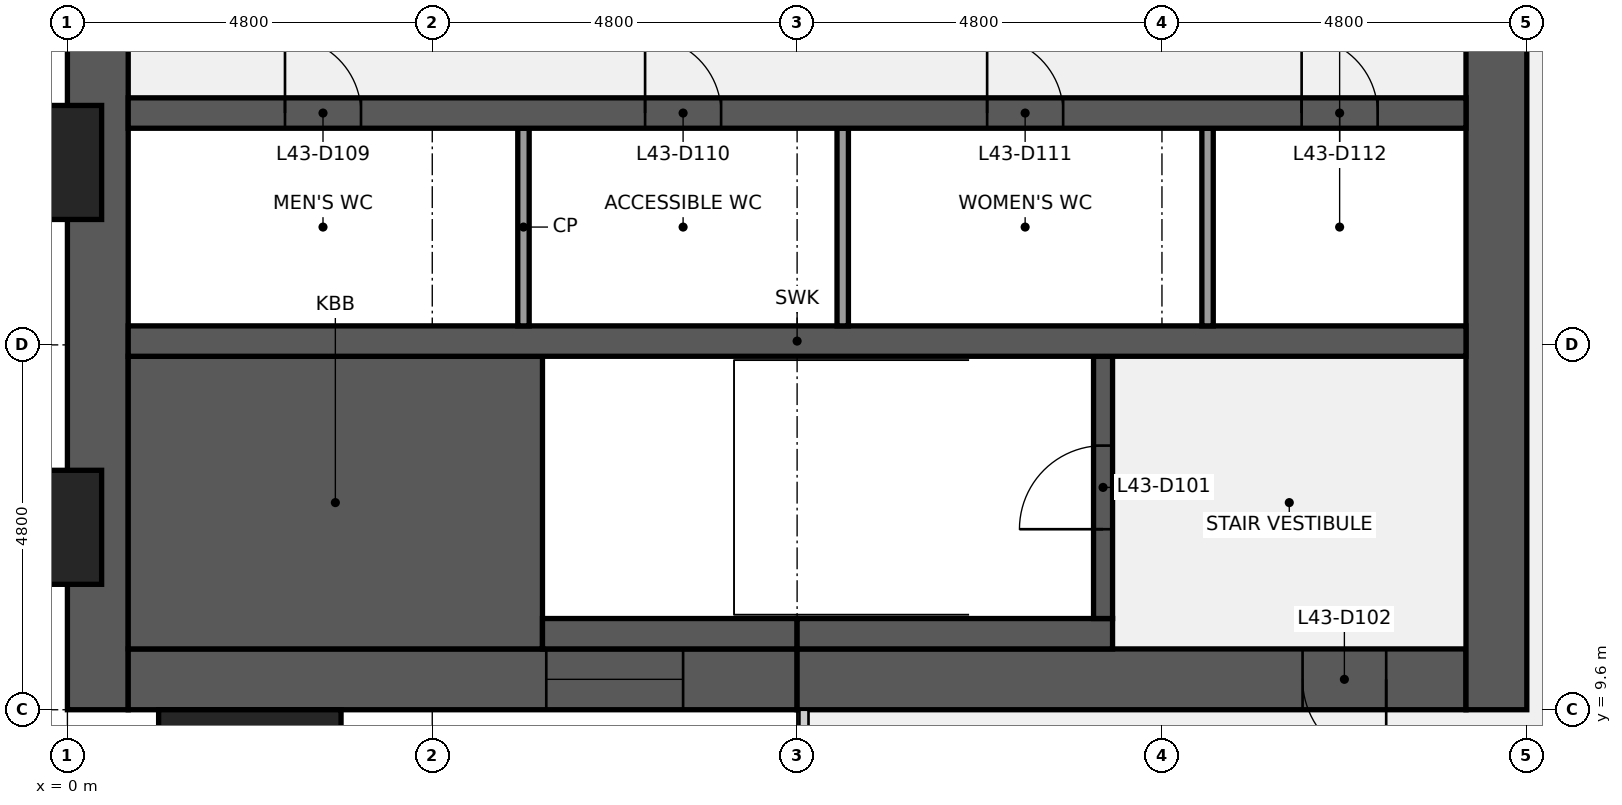
"""IFC4 building model, lengths in metres.
Left out: names, types, materials, properties, quantities, classifications, styles, units other than length and angle.
Written with IfcOpenShell. Run it as: python <this file> out.ifc"""

import sys

from ifc_helpers import new_model, si_unit, direction, frame, frame_2d, origin, origin_2d, place, context, subcontext, project, spatial, rectangle, extrude, element, fill, save


model = new_model("IFC4")
c1 = context("Model", 3, precision=1e-05, world=origin(), true_north=direction((0.0, 1.0)))
c2 = subcontext(c1, "Body", "Model", "MODEL_VIEW")
j1 = project(units=[si_unit("LENGTHUNIT", "METRE"), si_unit("PLANEANGLEUNIT", "RADIAN")], contexts=[c1])
p1 = place(None, origin())
s1 = spatial("IfcSite", under=j1, at=p1, CompositionType="ELEMENT")
p2 = place(p1, origin())
s2 = spatial("IfcBuilding", under=s1, at=p2, CompositionType="ELEMENT")
p3 = place(p2, frame((0.0, 0.0, 201.2)))
s3 = spatial("IfcBuildingStorey", under=s2, at=p3, CompositionType="ELEMENT", Elevation=201.2)
p4 = place(p3, frame((0.4, 9.6, 0.0), z_axis=(0.0, 0.0, 1.0), x_axis=(0.0, 1.0, 0.0)))
e1 = element("IfcWall", 1, at=p4, inside=s3, PredefinedType="SHEAR", context=c2, shape_type="SweptSolid", body=[
    extrude(rectangle(XDim=28.8, YDim=0.8, at=frame_2d((14.4, 0.0))), origin(), (0.0, 0.0, 1.0), 3.84),
])
p5 = place(p4, frame((8.85, 0.0, 0.9)))
e2 = element("IfcOpeningElement", 2, at=p5, cuts=e1, PredefinedType="OPENING", context=c2, shape_type="SweptSolid", body=[
    extrude(rectangle(XDim=1.5, YDim=1.5, at=frame_2d((0.75, 0.75))), frame((0.0, 0.41, 0.0), z_axis=(0.0, -1.0, 0.0), x_axis=(1.0, 0.0, 0.0)), (0.0, 0.0, 1.0), 0.82),
])
p6 = place(p4, frame((18.45, 0.0, 0.9)))
e3 = element("IfcOpeningElement", 3, at=p6, cuts=e1, PredefinedType="OPENING", context=c2, shape_type="SweptSolid", body=[
    extrude(rectangle(XDim=1.5, YDim=1.5, at=frame_2d((0.75, 0.75))), frame((0.0, 0.41, 0.0), z_axis=(0.0, -1.0, 0.0), x_axis=(1.0, 0.0, 0.0)), (0.0, 0.0, 1.0), 0.82),
])
p7 = place(p3, frame((9.6, 10.0, 0.0), z_axis=(0.0, 0.0, 1.0), x_axis=(-1.0, 0.0, 0.0)))
e4 = element("IfcWall", 4, at=p7, inside=s3, PredefinedType="SHEAR", context=c2, shape_type="SweptSolid", body=[
    extrude(rectangle(XDim=8.8, YDim=0.8, at=frame_2d((4.4, 0.0))), origin(), (0.0, 0.0, 1.0), 3.84),
])
p8 = place(p7, frame((1.5, 0.0, 0.9)))
e5 = element("IfcOpeningElement", 5, at=p8, cuts=e4, PredefinedType="OPENING", context=c2, shape_type="SweptSolid", body=[
    extrude(rectangle(XDim=1.8, YDim=1.5, at=frame_2d((0.9, 0.75))), frame((0.0, 0.41, 0.0), z_axis=(0.0, -1.0, 0.0), x_axis=(1.0, 0.0, 0.0)), (0.0, 0.0, 1.0), 0.82),
])
p9 = place(p3, frame((18.4, 10.0, 0.0), z_axis=(0.0, 0.0, 1.0), x_axis=(-1.0, 0.0, 0.0)))
e6 = element("IfcWall", 6, at=p9, inside=s3, PredefinedType="SHEAR", context=c2, shape_type="SweptSolid", body=[
    extrude(rectangle(XDim=8.8, YDim=0.8, at=frame_2d((4.4, 0.0))), origin(), (0.0, 0.0, 1.0), 3.84),
])
p10 = place(p9, frame((1.05, 0.0, 0.0)))
e7 = element("IfcOpeningElement", 7, at=p10, cuts=e6, PredefinedType="OPENING", context=c2, shape_type="SweptSolid", body=[
    extrude(rectangle(XDim=1.1, YDim=2.1, at=frame_2d((0.55, 1.05))), frame((0.0, 0.41, 0.0), z_axis=(0.0, -1.0, 0.0), x_axis=(1.0, 0.0, 0.0)), (0.0, 0.0, 1.0), 0.82),
])
p11 = place(p3, frame((18.8, 38.4, 0.0), z_axis=(0.0, 0.0, 1.0), x_axis=(0.0, -1.0, 0.0)))
e8 = element("IfcWall", 8, at=p11, inside=s3, PredefinedType="SHEAR", context=c2, shape_type="SweptSolid", body=[
    extrude(rectangle(XDim=28.8, YDim=0.8, at=frame_2d((14.4, 0.0))), origin(), (0.0, 0.0, 1.0), 3.84),
])
p12 = place(p11, frame((18.3, 0.0, 0.0)))
e9 = element("IfcOpeningElement", 9, at=p12, cuts=e8, PredefinedType="OPENING", context=c2, shape_type="SweptSolid", body=[
    extrude(rectangle(XDim=1.8, YDim=2.1, at=frame_2d((0.9, 1.05))), frame((0.0, 0.41, 0.0), z_axis=(0.0, -1.0, 0.0), x_axis=(1.0, 0.0, 0.0)), (0.0, 0.0, 1.0), 0.82),
])
p13 = place(p11, frame((8.7, 0.0, 0.0)))
e10 = element("IfcOpeningElement", 10, at=p13, cuts=e8, PredefinedType="OPENING", context=c2, shape_type="SweptSolid", body=[
    extrude(rectangle(XDim=1.8, YDim=2.1, at=frame_2d((0.9, 1.05))), frame((0.0, 0.41, 0.0), z_axis=(0.0, -1.0, 0.0), x_axis=(1.0, 0.0, 0.0)), (0.0, 0.0, 1.0), 0.82),
])
p14 = place(p3, frame((0.8, 12.325, 0.0), z_axis=(0.0, 0.0, 1.0), x_axis=(1.0, 0.0, 0.0)))
e11 = element("IfcWall", 11, at=p14, inside=s3, PredefinedType="SHEAR", context=c2, shape_type="SweptSolid", body=[
    extrude(rectangle(XDim=5.45, YDim=3.85, at=frame_2d((2.725, 0.0))), origin(), (0.0, 0.0, 1.0), 3.84),
])
p15 = place(p3, frame((6.25, 10.6, 0.0), z_axis=(0.0, 0.0, 1.0), x_axis=(1.0, 0.0, 0.0)))
e12 = element("IfcWall", 12, at=p15, inside=s3, PredefinedType="SHEAR", context=c2, shape_type="SweptSolid", body=[
    extrude(rectangle(XDim=3.35, YDim=0.4, at=frame_2d((1.675, 0.0))), origin(), (0.0, 0.0, 1.0), 3.84),
])
p16 = place(p3, frame((9.6, 10.6, 0.0), z_axis=(0.0, 0.0, 1.0), x_axis=(1.0, 0.0, 0.0)))
e13 = element("IfcWall", 13, at=p16, inside=s3, PredefinedType="SHEAR", context=c2, shape_type="SweptSolid", body=[
    extrude(rectangle(XDim=4.15, YDim=0.4, at=frame_2d((2.075, 0.0))), origin(), (0.0, 0.0, 1.0), 3.84),
])
p17 = place(p3, frame((13.625, 10.8, 0.0), z_axis=(0.0, 0.0, 1.0), x_axis=(0.0, 1.0, 0.0)))
e14 = element("IfcWall", 14, at=p17, inside=s3, PredefinedType="SHEAR", context=c2, shape_type="SweptSolid", body=[
    extrude(rectangle(XDim=3.45, YDim=0.25, at=frame_2d((1.725, 0.0))), origin(), (0.0, 0.0, 1.0), 3.84),
])
p18 = place(p17, frame((1.175, 0.0, 0.0)))
e15 = element("IfcOpeningElement", 15, at=p18, cuts=e14, PredefinedType="OPENING", context=c2, shape_type="SweptSolid", body=[
    extrude(rectangle(XDim=1.1, YDim=2.1, at=frame_2d((0.55, 1.05))), frame((0.0, 0.135, 0.0), z_axis=(0.0, -1.0, 0.0), x_axis=(1.0, 0.0, 0.0)), (0.0, 0.0, 1.0), 0.27),
])
p19 = place(p3, frame((0.8, 14.45, 0.0), z_axis=(0.0, 0.0, 1.0), x_axis=(1.0, 0.0, 0.0)))
e16 = element("IfcWall", 16, at=p19, inside=s3, PredefinedType="SHEAR", context=c2, shape_type="SweptSolid", body=[
    extrude(rectangle(XDim=17.6, YDim=0.4, at=frame_2d((8.8, 0.0))), origin(), (0.0, 0.0, 1.0), 3.84),
])
for number, where, z_axis, x_axis in (
    (17, (6.0, 14.65, 0.0), (0.0, 0.0, 1.0), (0.0, 1.0, 0.0)),
    (18, (10.2, 14.65, 0.0), (0.0, 0.0, 1.0), (0.0, 1.0, 0.0)),
    (19, (15.0, 14.65, 0.0), (0.0, 0.0, 1.0), (0.0, 1.0, 0.0)),
):
    element("IfcWall", number, at=place(p3, frame(where, z_axis=z_axis, x_axis=x_axis)), inside=s3, PredefinedType="PARTITIONING", context=c2, shape_type="SweptSolid", body=[
        extrude(rectangle(XDim=2.6, YDim=0.15, at=frame_2d((1.3, 0.0))), origin(), (0.0, 0.0, 1.0), 3.84),
    ])
p20 = place(p3, frame((0.8, 17.45, 0.0), z_axis=(0.0, 0.0, 1.0), x_axis=(1.0, 0.0, 0.0)))
e20 = element("IfcWall", 20, at=p20, inside=s3, PredefinedType="SHEAR", context=c2, shape_type="SweptSolid", body=[
    extrude(rectangle(XDim=17.6, YDim=0.4, at=frame_2d((8.8, 0.0))), origin(), (0.0, 0.0, 1.0), 3.84),
])
p21 = place(p20, frame((2.062, 0.0, 0.0)))
e21 = element("IfcOpeningElement", 21, at=p21, cuts=e20, PredefinedType="OPENING", context=c2, shape_type="SweptSolid", body=[
    extrude(rectangle(XDim=1.0, YDim=2.1, at=frame_2d((0.5, 1.05))), frame((0.0, 0.21, 0.0), z_axis=(0.0, -1.0, 0.0), x_axis=(1.0, 0.0, 0.0)), (0.0, 0.0, 1.0), 0.42),
])
p22 = place(p20, frame((6.8, 0.0, 0.0)))
e22 = element("IfcOpeningElement", 22, at=p22, cuts=e20, PredefinedType="OPENING", context=c2, shape_type="SweptSolid", body=[
    extrude(rectangle(XDim=1.0, YDim=2.1, at=frame_2d((0.5, 1.05))), frame((0.0, 0.21, 0.0), z_axis=(0.0, -1.0, 0.0), x_axis=(1.0, 0.0, 0.0)), (0.0, 0.0, 1.0), 0.42),
])
p23 = place(p20, frame((11.3, 0.0, 0.0)))
e23 = element("IfcOpeningElement", 23, at=p23, cuts=e20, PredefinedType="OPENING", context=c2, shape_type="SweptSolid", body=[
    extrude(rectangle(XDim=1.0, YDim=2.1, at=frame_2d((0.5, 1.05))), frame((0.0, 0.21, 0.0), z_axis=(0.0, -1.0, 0.0), x_axis=(1.0, 0.0, 0.0)), (0.0, 0.0, 1.0), 0.42),
])
p24 = place(p20, frame((15.438, 0.0, 0.0)))
e24 = element("IfcOpeningElement", 24, at=p24, cuts=e20, PredefinedType="OPENING", context=c2, shape_type="SweptSolid", body=[
    extrude(rectangle(XDim=1.0, YDim=2.1, at=frame_2d((0.5, 1.05))), frame((0.0, 0.21, 0.0), z_axis=(0.0, -1.0, 0.0), x_axis=(1.0, 0.0, 0.0)), (0.0, 0.0, 1.0), 0.42),
])
for number, where, z_axis, x_axis in (
    (25, (-0.75, 12.0, 0.0), (0.0, 0.0, 1.0), (0.0, 1.0, 0.0)),
    (26, (-0.75, 16.8, 0.0), (0.0, 0.0, 1.0), (0.0, 1.0, 0.0)),
    (27, (2.4, 8.85, 0.0), (0.0, 0.0, 1.0), (1.0, 0.0, 0.0)),
):
    element("IfcColumn", number, at=place(p3, frame(where, z_axis=z_axis, x_axis=x_axis)), inside=s3, PredefinedType="PILASTER", context=c2, shape_type="SweptSolid", body=[
        extrude(rectangle(XDim=2.4, YDim=1.5, at=origin_2d()), origin(), (0.0, 0.0, 1.0), 4.0),
    ])
p25 = place(p18, origin())
e28 = element("IfcDoor", 28, at=p25, inside=s3, OperationType="SINGLE_SWING_LEFT", PredefinedType="DOOR", context=c2, shape_type="SweptSolid", body=[
    extrude(rectangle(XDim=1.1, YDim=2.1, at=frame_2d((0.55, 1.05))), frame((0.0, 0.025, 0.0), z_axis=(0.0, -1.0, 0.0), x_axis=(1.0, 0.0, 0.0)), (0.0, 0.0, 1.0), 0.05),
])
fill(e15, e28)
p26 = place(p10, origin())
e29 = element("IfcDoor", 29, at=p26, inside=s3, OperationType="SINGLE_SWING_LEFT", PredefinedType="DOOR", context=c2, shape_type="SweptSolid", body=[
    extrude(rectangle(XDim=1.1, YDim=2.1, at=frame_2d((0.55, 1.05))), frame((0.0, 0.025, 0.0), z_axis=(0.0, -1.0, 0.0), x_axis=(1.0, 0.0, 0.0)), (0.0, 0.0, 1.0), 0.05),
])
fill(e7, e29)
p27 = place(p21, origin())
e30 = element("IfcDoor", 30, at=p27, inside=s3, OperationType="SINGLE_SWING_LEFT", PredefinedType="DOOR", context=c2, shape_type="SweptSolid", body=[
    extrude(rectangle(XDim=1.0, YDim=2.1, at=frame_2d((0.5, 1.05))), frame((0.0, 0.025, 0.0), z_axis=(0.0, -1.0, 0.0), x_axis=(1.0, 0.0, 0.0)), (0.0, 0.0, 1.0), 0.05),
])
fill(e21, e30)
p28 = place(p22, origin())
e31 = element("IfcDoor", 31, at=p28, inside=s3, OperationType="SINGLE_SWING_LEFT", PredefinedType="DOOR", context=c2, shape_type="SweptSolid", body=[
    extrude(rectangle(XDim=1.0, YDim=2.1, at=frame_2d((0.5, 1.05))), frame((0.0, 0.025, 0.0), z_axis=(0.0, -1.0, 0.0), x_axis=(1.0, 0.0, 0.0)), (0.0, 0.0, 1.0), 0.05),
])
fill(e22, e31)
p29 = place(p23, origin())
e32 = element("IfcDoor", 32, at=p29, inside=s3, OperationType="SINGLE_SWING_LEFT", PredefinedType="DOOR", context=c2, shape_type="SweptSolid", body=[
    extrude(rectangle(XDim=1.0, YDim=2.1, at=frame_2d((0.5, 1.05))), frame((0.0, 0.025, 0.0), z_axis=(0.0, -1.0, 0.0), x_axis=(1.0, 0.0, 0.0)), (0.0, 0.0, 1.0), 0.05),
])
fill(e23, e32)
p30 = place(p24, origin())
e33 = element("IfcDoor", 33, at=p30, inside=s3, OperationType="SINGLE_SWING_LEFT", PredefinedType="DOOR", context=c2, shape_type="SweptSolid", body=[
    extrude(rectangle(XDim=1.0, YDim=2.1, at=frame_2d((0.5, 1.05))), frame((0.0, 0.025, 0.0), z_axis=(0.0, -1.0, 0.0), x_axis=(1.0, 0.0, 0.0)), (0.0, 0.0, 1.0), 0.05),
])
fill(e24, e33)
p31 = place(p8, origin())
e34 = element("IfcWindow", 34, at=p31, inside=s3, PartitioningType="SINGLE_PANEL", PredefinedType="WINDOW", context=c2, shape_type="SweptSolid", body=[
    extrude(rectangle(XDim=1.8, YDim=1.5, at=frame_2d((0.9, 0.75))), frame((0.0, 0.03, 0.0), z_axis=(0.0, -1.0, 0.0), x_axis=(1.0, 0.0, 0.0)), (0.0, 0.0, 1.0), 0.06),
])
fill(e5, e34)
save(model, sys.argv[1])
